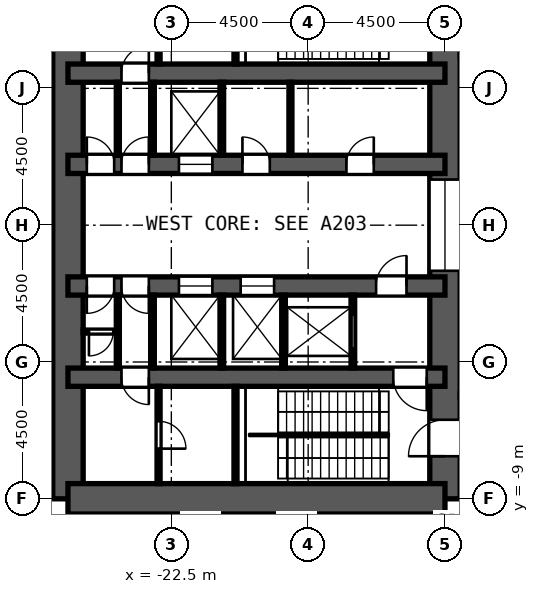
"""IFC4 building model, lengths in metres.
Left out: names, types, materials, properties, quantities, classifications, styles, units other than length and angle.
Written with IfcOpenShell. Run it as: python <this file> out.ifc"""

import sys

from ifc_helpers import new_model, si_unit, direction, frame, frame_2d, origin, place, context, subcontext, project, spatial, rectangle, extrude, element, fill, save


model = new_model("IFC4")
c1 = context("Model", 3, precision=1e-05, world=origin(), true_north=direction((0.0, 1.0)))
c2 = subcontext(c1, "Body", "Model", "MODEL_VIEW")
j1 = project(units=[si_unit("LENGTHUNIT", "METRE"), si_unit("PLANEANGLEUNIT", "RADIAN")], contexts=[c1])
p1 = place(None, origin())
s1 = spatial("IfcSite", under=j1, at=p1, CompositionType="ELEMENT")
p2 = place(p1, origin())
s2 = spatial("IfcBuilding", under=s1, at=p2, CompositionType="ELEMENT")
p3 = place(p2, origin())
s3 = spatial("IfcBuildingStorey", under=s2, at=p3, CompositionType="ELEMENT", Elevation=0.0)
p4 = place(p3, frame((-13.5, -9.0, 0.0), z_axis=(0.0, 0.0, 1.0), x_axis=(0.0, 1.0, 0.0)))
e1 = element("IfcWall", 1, at=p4, inside=s3, PredefinedType="SHEAR", context=c2, shape_type="SweptSolid", body=[
    extrude(rectangle(XDim=18.0, YDim=1.0, at=frame_2d((9.0, 0.0))), origin(), (0.0, 0.0, 1.0), 5.0),
])
p5 = place(p4, frame((15.4, 0.0, 0.0)))
e2 = element("IfcOpeningElement", 2, at=p5, cuts=e1, PredefinedType="OPENING", context=c2, shape_type="SweptSolid", body=[
    extrude(rectangle(XDim=1.2, YDim=2.1, at=frame_2d((0.6, 1.05))), frame((0.0, 0.512, 0.0), z_axis=(0.0, -1.0, 0.0), x_axis=(1.0, 0.0, 0.0)), (0.0, 0.0, 1.0), 1.024),
])
p6 = place(p4, frame((1.4, 0.0, 0.0)))
e3 = element("IfcOpeningElement", 3, at=p6, cuts=e1, PredefinedType="OPENING", context=c2, shape_type="SweptSolid", body=[
    extrude(rectangle(XDim=1.2, YDim=2.1, at=frame_2d((0.6, 1.05))), frame((0.0, 0.512, 0.0), z_axis=(0.0, -1.0, 0.0), x_axis=(1.0, 0.0, 0.0)), (0.0, 0.0, 1.0), 1.024),
])
p7 = place(p4, frame((7.5, 0.0, 0.0)))
e4 = element("IfcOpeningElement", 4, at=p7, cuts=e1, PredefinedType="OPENING", context=c2, shape_type="SweptSolid", body=[
    extrude(rectangle(XDim=3.0, YDim=2.4, at=frame_2d((1.5, 1.2))), frame((0.0, 0.512, 0.0), z_axis=(0.0, -1.0, 0.0), x_axis=(1.0, 0.0, 0.0)), (0.0, 0.0, 1.0), 1.024),
])
p8 = place(p3, frame((-25.9, -9.0, 0.0), z_axis=(0.0, 0.0, 1.0), x_axis=(0.0, 1.0, 0.0)))
e5 = element("IfcWall", 5, at=p8, inside=s3, PredefinedType="SHEAR", context=c2, shape_type="SweptSolid", body=[
    extrude(rectangle(XDim=18.0, YDim=1.0, at=frame_2d((9.0, 0.0))), origin(), (0.0, 0.0, 1.0), 5.0),
])
p9 = place(p3, frame((-13.5, -9.0, 0.0), z_axis=(0.0, 0.0, 1.0), x_axis=(-1.0, 0.0, 0.0)))
e6 = element("IfcWall", 6, at=p9, inside=s3, PredefinedType="SHEAR", context=c2, shape_type="SweptSolid", body=[
    extrude(rectangle(XDim=12.4, YDim=1.0, at=frame_2d((6.2, 0.0))), origin(), (0.0, 0.0, 1.0), 5.0),
])
p10 = place(p3, frame((-13.5, 5.0, 0.0), z_axis=(0.0, 0.0, 1.0), x_axis=(-1.0, 0.0, 0.0)))
e7 = element("IfcWall", 7, at=p10, inside=s3, PredefinedType="SHEAR", context=c2, shape_type="SweptSolid", body=[
    extrude(rectangle(XDim=12.4, YDim=0.6, at=frame_2d((6.2, 0.0))), origin(), (0.0, 0.0, 1.0), 5.0),
])
p11 = place(p10, frame((9.74, 0.0, 0.0)))
e8 = element("IfcOpeningElement", 8, at=p11, cuts=e7, PredefinedType="OPENING", context=c2, shape_type="SweptSolid", body=[
    extrude(rectangle(XDim=0.9, YDim=2.1, at=frame_2d((0.45, 1.05))), frame((0.0, 0.312, 0.0), z_axis=(0.0, -1.0, 0.0), x_axis=(1.0, 0.0, 0.0)), (0.0, 0.0, 1.0), 0.624),
])
p12 = place(p3, frame((-13.5, -5.0, 0.0), z_axis=(0.0, 0.0, 1.0), x_axis=(-1.0, 0.0, 0.0)))
e9 = element("IfcWall", 9, at=p12, inside=s3, PredefinedType="SHEAR", context=c2, shape_type="SweptSolid", body=[
    extrude(rectangle(XDim=12.4, YDim=0.6, at=frame_2d((6.2, 0.0))), origin(), (0.0, 0.0, 1.0), 5.0),
])
p13 = place(p12, frame((9.74, 0.0, 0.0)))
e10 = element("IfcOpeningElement", 10, at=p13, cuts=e9, PredefinedType="OPENING", context=c2, shape_type="SweptSolid", body=[
    extrude(rectangle(XDim=0.9, YDim=2.1, at=frame_2d((0.45, 1.05))), frame((0.0, 0.312, 0.0), z_axis=(0.0, -1.0, 0.0), x_axis=(1.0, 0.0, 0.0)), (0.0, 0.0, 1.0), 0.624),
])
p14 = place(p12, frame((0.6, 0.0, 0.0)))
e11 = element("IfcOpeningElement", 11, at=p14, cuts=e9, PredefinedType="OPENING", context=c2, shape_type="SweptSolid", body=[
    extrude(rectangle(XDim=1.1, YDim=2.1, at=frame_2d((0.55, 1.05))), frame((0.0, 0.312, 0.0), z_axis=(0.0, -1.0, 0.0), x_axis=(1.0, 0.0, 0.0)), (0.0, 0.0, 1.0), 0.624),
])
p15 = place(p3, frame((-13.5, 2.0, 0.0), z_axis=(0.0, 0.0, 1.0), x_axis=(-1.0, 0.0, 0.0)))
e12 = element("IfcWall", 12, at=p15, inside=s3, PredefinedType="SHEAR", context=c2, shape_type="SweptSolid", body=[
    extrude(rectangle(XDim=12.4, YDim=0.6, at=frame_2d((6.2, 0.0))), origin(), (0.0, 0.0, 1.0), 5.0),
])
p16 = place(p15, frame((7.65, 0.0, 0.0)))
e13 = element("IfcOpeningElement", 13, at=p16, cuts=e12, PredefinedType="OPENING", context=c2, shape_type="SweptSolid", body=[
    extrude(rectangle(XDim=1.1, YDim=2.1, at=frame_2d((0.55, 1.05))), frame((0.0, 0.312, 0.0), z_axis=(0.0, -1.0, 0.0), x_axis=(1.0, 0.0, 0.0)), (0.0, 0.0, 1.0), 0.624),
])
p17 = place(p15, frame((2.341, 0.0, 0.0)))
e14 = element("IfcOpeningElement", 14, at=p17, cuts=e12, PredefinedType="OPENING", context=c2, shape_type="SweptSolid", body=[
    extrude(rectangle(XDim=0.9, YDim=2.1, at=frame_2d((0.45, 1.05))), frame((0.0, 0.312, 0.0), z_axis=(0.0, -1.0, 0.0), x_axis=(1.0, 0.0, 0.0)), (0.0, 0.0, 1.0), 0.624),
])
p18 = place(p15, frame((5.761, 0.0, 0.0)))
e15 = element("IfcOpeningElement", 15, at=p18, cuts=e12, PredefinedType="OPENING", context=c2, shape_type="SweptSolid", body=[
    extrude(rectangle(XDim=0.9, YDim=2.1, at=frame_2d((0.45, 1.05))), frame((0.0, 0.312, 0.0), z_axis=(0.0, -1.0, 0.0), x_axis=(1.0, 0.0, 0.0)), (0.0, 0.0, 1.0), 0.624),
])
p19 = place(p15, frame((9.74, 0.0, 0.0)))
e16 = element("IfcOpeningElement", 16, at=p19, cuts=e12, PredefinedType="OPENING", context=c2, shape_type="SweptSolid", body=[
    extrude(rectangle(XDim=0.9, YDim=2.1, at=frame_2d((0.45, 1.05))), frame((0.0, 0.312, 0.0), z_axis=(0.0, -1.0, 0.0), x_axis=(1.0, 0.0, 0.0)), (0.0, 0.0, 1.0), 0.624),
])
p20 = place(p15, frame((10.88, 0.0, 0.0)))
e17 = element("IfcOpeningElement", 17, at=p20, cuts=e12, PredefinedType="OPENING", context=c2, shape_type="SweptSolid", body=[
    extrude(rectangle(XDim=0.9, YDim=2.1, at=frame_2d((0.45, 1.05))), frame((0.0, 0.312, 0.0), z_axis=(0.0, -1.0, 0.0), x_axis=(1.0, 0.0, 0.0)), (0.0, 0.0, 1.0), 0.624),
])
p21 = place(p3, frame((-13.5, -2.0, 0.0), z_axis=(0.0, 0.0, 1.0), x_axis=(-1.0, 0.0, 0.0)))
e18 = element("IfcWall", 18, at=p21, inside=s3, PredefinedType="SHEAR", context=c2, shape_type="SweptSolid", body=[
    extrude(rectangle(XDim=12.4, YDim=0.6, at=frame_2d((6.2, 0.0))), origin(), (0.0, 0.0, 1.0), 5.0),
])
p22 = place(p21, frame((5.62, 0.0, 0.0)))
e19 = element("IfcOpeningElement", 19, at=p22, cuts=e18, PredefinedType="OPENING", context=c2, shape_type="SweptSolid", body=[
    extrude(rectangle(XDim=1.1, YDim=2.1, at=frame_2d((0.55, 1.05))), frame((0.0, 0.312, 0.0), z_axis=(0.0, -1.0, 0.0), x_axis=(1.0, 0.0, 0.0)), (0.0, 0.0, 1.0), 0.624),
])
p23 = place(p21, frame((7.65, 0.0, 0.0)))
e20 = element("IfcOpeningElement", 20, at=p23, cuts=e18, PredefinedType="OPENING", context=c2, shape_type="SweptSolid", body=[
    extrude(rectangle(XDim=1.1, YDim=2.1, at=frame_2d((0.55, 1.05))), frame((0.0, 0.312, 0.0), z_axis=(0.0, -1.0, 0.0), x_axis=(1.0, 0.0, 0.0)), (0.0, 0.0, 1.0), 0.624),
])
p24 = place(p21, frame((1.265, 0.0, 0.0)))
e21 = element("IfcOpeningElement", 21, at=p24, cuts=e18, PredefinedType="OPENING", context=c2, shape_type="SweptSolid", body=[
    extrude(rectangle(XDim=1.0, YDim=2.1, at=frame_2d((0.5, 1.05))), frame((0.0, 0.312, 0.0), z_axis=(0.0, -1.0, 0.0), x_axis=(1.0, 0.0, 0.0)), (0.0, 0.0, 1.0), 0.624),
])
p25 = place(p21, frame((9.74, 0.0, 0.0)))
e22 = element("IfcOpeningElement", 22, at=p25, cuts=e18, PredefinedType="OPENING", context=c2, shape_type="SweptSolid", body=[
    extrude(rectangle(XDim=0.9, YDim=2.1, at=frame_2d((0.45, 1.05))), frame((0.0, 0.312, 0.0), z_axis=(0.0, -1.0, 0.0), x_axis=(1.0, 0.0, 0.0)), (0.0, 0.0, 1.0), 0.624),
])
p26 = place(p21, frame((10.88, 0.0, 0.0)))
e23 = element("IfcOpeningElement", 23, at=p26, cuts=e18, PredefinedType="OPENING", context=c2, shape_type="SweptSolid", body=[
    extrude(rectangle(XDim=0.9, YDim=2.1, at=frame_2d((0.45, 1.05))), frame((0.0, 0.312, 0.0), z_axis=(0.0, -1.0, 0.0), x_axis=(1.0, 0.0, 0.0)), (0.0, 0.0, 1.0), 0.624),
])
p27 = place(p3, frame((-27.73, -7.403, 0.0), z_axis=(0.0, 0.0, 1.0), x_axis=(0.342034744565, -0.939687306241, 0.0)))
e24 = element("IfcWall", 24, at=p27, inside=s3, PredefinedType="SOLIDWALL", context=c2, shape_type="SweptSolid", body=[
    extrude(rectangle(XDim=4.099, YDim=0.6, at=frame_2d((2.05, 0.0))), origin(), (0.0, 0.0, 1.0), 4.45),
])
p28 = place(p3, frame((-18.583, 2.3, 0.0), z_axis=(0.0, 0.0, 1.0), x_axis=(0.0, 1.0, 0.0)))
e25 = element("IfcWall", 25, at=p28, inside=s3, PredefinedType="PARTITIONING", context=c2, shape_type="SweptSolid", body=[
    extrude(rectangle(XDim=2.4, YDim=0.1, at=frame_2d((1.2, 0.0))), origin(), (0.0, 0.0, 1.0), 4.45),
])
for number, where, z_axis, x_axis in (
    (26, (-20.84, 2.3, 0.0), (0.0, 0.0, 1.0), (0.0, 1.0, 0.0)),
    (27, (-23.12, 2.3, 0.0), (0.0, 0.0, 1.0), (0.0, 1.0, 0.0)),
):
    element("IfcWall", number, at=place(p3, frame(where, z_axis=z_axis, x_axis=x_axis)), inside=s3, PredefinedType="PARTITIONING", context=c2, shape_type="SweptSolid", body=[
        extrude(rectangle(XDim=2.4, YDim=0.12, at=frame_2d((1.2, 0.0))), origin(), (0.0, 0.0, 1.0), 4.45),
    ])
p29 = place(p3, frame((-24.26, 2.3, 0.0), z_axis=(0.0, 0.0, 1.0), x_axis=(0.0, 1.0, 0.0)))
e28 = element("IfcWall", 28, at=p29, inside=s3, PredefinedType="PARTITIONING", context=c2, shape_type="SweptSolid", body=[
    extrude(rectangle(XDim=2.4, YDim=0.1, at=frame_2d((1.2, 0.0))), origin(), (0.0, 0.0, 1.0), 4.45),
])
p30 = place(p3, frame((-16.53, -4.7, 0.0), z_axis=(0.0, 0.0, 1.0), x_axis=(0.0, 1.0, 0.0)))
e29 = element("IfcWall", 29, at=p30, inside=s3, PredefinedType="PARTITIONING", context=c2, shape_type="SweptSolid", body=[
    extrude(rectangle(XDim=2.4, YDim=0.12, at=frame_2d((1.2, 0.0))), origin(), (0.0, 0.0, 1.0), 4.45),
])
p31 = place(p30, frame((0.65, 0.0, 0.0)))
e30 = element("IfcOpeningElement", 30, at=p31, cuts=e29, PredefinedType="OPENING", context=c2, shape_type="SweptSolid", body=[
    extrude(rectangle(XDim=1.1, YDim=2.1, at=frame_2d((0.55, 1.05))), frame((0.0, 0.072, 0.0), z_axis=(0.0, -1.0, 0.0), x_axis=(1.0, 0.0, 0.0)), (0.0, 0.0, 1.0), 0.144),
])
for number, where, z_axis, x_axis in (
    (31, (-18.81, -4.7, 0.0), (0.0, 0.0, 1.0), (0.0, 1.0, 0.0)),
    (32, (-20.84, -4.7, 0.0), (0.0, 0.0, 1.0), (0.0, 1.0, 0.0)),
    (33, (-23.12, -4.7, 0.0), (0.0, 0.0, 1.0), (0.0, 1.0, 0.0)),
):
    element("IfcWall", number, at=place(p3, frame(where, z_axis=z_axis, x_axis=x_axis)), inside=s3, PredefinedType="PARTITIONING", context=c2, shape_type="SweptSolid", body=[
        extrude(rectangle(XDim=2.4, YDim=0.12, at=frame_2d((1.2, 0.0))), origin(), (0.0, 0.0, 1.0), 4.45),
    ])
p32 = place(p3, frame((-24.26, -4.7, 0.0), z_axis=(0.0, 0.0, 1.0), x_axis=(0.0, 1.0, 0.0)))
e34 = element("IfcWall", 34, at=p32, inside=s3, PredefinedType="PARTITIONING", context=c2, shape_type="SweptSolid", body=[
    extrude(rectangle(XDim=2.4, YDim=0.1, at=frame_2d((1.2, 0.0))), origin(), (0.0, 0.0, 1.0), 4.45),
])
p33 = place(p3, frame((-24.26, -3.5, 0.0), z_axis=(0.0, 0.0, 1.0), x_axis=(-1.0, 0.0, 0.0)))
e35 = element("IfcWall", 35, at=p33, inside=s3, PredefinedType="PARTITIONING", context=c2, shape_type="SweptSolid", body=[
    extrude(rectangle(XDim=1.14, YDim=0.1, at=frame_2d((0.57, 0.0))), origin(), (0.0, 0.0, 1.0), 4.45),
])
p34 = place(p33, frame((0.15, 0.0, 0.0)))
e36 = element("IfcOpeningElement", 36, at=p34, cuts=e35, PredefinedType="OPENING", context=c2, shape_type="SweptSolid", body=[
    extrude(rectangle(XDim=0.8, YDim=2.1, at=frame_2d((0.4, 1.05))), frame((0.0, 0.062, 0.0), z_axis=(0.0, -1.0, 0.0), x_axis=(1.0, 0.0, 0.0)), (0.0, 0.0, 1.0), 0.124),
])
p35 = place(p3, frame((-20.39, 5.3, 0.0), z_axis=(0.0, 0.0, 1.0), x_axis=(0.0, 1.0, 0.0)))
e37 = element("IfcWall", 37, at=p35, inside=s3, PredefinedType="PARTITIONING", context=c2, shape_type="SweptSolid", body=[
    extrude(rectangle(XDim=3.2, YDim=0.1, at=frame_2d((1.6, 0.0))), origin(), (0.0, 0.0, 1.0), 4.45),
])
p36 = place(p3, frame((-22.92, 5.3, 0.0), z_axis=(0.0, 0.0, 1.0), x_axis=(0.0, 1.0, 0.0)))
e38 = element("IfcWall", 38, at=p36, inside=s3, PredefinedType="PARTITIONING", context=c2, shape_type="SweptSolid", body=[
    extrude(rectangle(XDim=3.2, YDim=0.1, at=frame_2d((1.6, 0.0))), origin(), (0.0, 0.0, 1.0), 4.45),
])
p37 = place(p36, frame((1.15, 0.0, 0.0)))
e39 = element("IfcOpeningElement", 39, at=p37, cuts=e38, PredefinedType="OPENING", context=c2, shape_type="SweptSolid", body=[
    extrude(rectangle(XDim=0.9, YDim=2.1, at=frame_2d((0.45, 1.05))), frame((0.0, 0.062, 0.0), z_axis=(0.0, -1.0, 0.0), x_axis=(1.0, 0.0, 0.0)), (0.0, 0.0, 1.0), 0.124),
])
p38 = place(p3, frame((-20.39, -8.5, 0.0), z_axis=(0.0, 0.0, 1.0), x_axis=(0.0, 1.0, 0.0)))
e40 = element("IfcWall", 40, at=p38, inside=s3, PredefinedType="PARTITIONING", context=c2, shape_type="SweptSolid", body=[
    extrude(rectangle(XDim=3.2, YDim=0.1, at=frame_2d((1.6, 0.0))), origin(), (0.0, 0.0, 1.0), 4.45),
])
p39 = place(p3, frame((-22.92, -8.5, 0.0), z_axis=(0.0, 0.0, 1.0), x_axis=(0.0, 1.0, 0.0)))
e41 = element("IfcWall", 41, at=p39, inside=s3, PredefinedType="PARTITIONING", context=c2, shape_type="SweptSolid", body=[
    extrude(rectangle(XDim=3.2, YDim=0.1, at=frame_2d((1.6, 0.0))), origin(), (0.0, 0.0, 1.0), 4.45),
])
p40 = place(p39, frame((1.15, 0.0, 0.0)))
e42 = element("IfcOpeningElement", 42, at=p40, cuts=e41, PredefinedType="OPENING", context=c2, shape_type="SweptSolid", body=[
    extrude(rectangle(XDim=0.9, YDim=2.1, at=frame_2d((0.45, 1.05))), frame((0.0, 0.062, 0.0), z_axis=(0.0, -1.0, 0.0), x_axis=(1.0, 0.0, 0.0)), (0.0, 0.0, 1.0), 0.124),
])
p41 = place(p16, origin())
e43 = element("IfcDoor", 43, at=p41, inside=s3, OperationType="DOUBLE_DOOR_SLIDING", PredefinedType="DOOR", context=c2, shape_type="SweptSolid", body=[
    extrude(rectangle(XDim=1.1, YDim=2.1, at=frame_2d((0.55, 1.05))), frame((0.0, 0.025, 0.0), z_axis=(0.0, -1.0, 0.0), x_axis=(1.0, 0.0, 0.0)), (0.0, 0.0, 1.0), 0.05),
])
fill(e13, e43)
p42 = place(p31, origin())
e44 = element("IfcDoor", 44, at=p42, inside=s3, OperationType="DOUBLE_DOOR_SLIDING", PredefinedType="DOOR", context=c2, shape_type="SweptSolid", body=[
    extrude(rectangle(XDim=1.1, YDim=2.1, at=frame_2d((0.55, 1.05))), frame((0.0, 0.025, 0.0), z_axis=(0.0, -1.0, 0.0), x_axis=(1.0, 0.0, 0.0)), (0.0, 0.0, 1.0), 0.05),
])
fill(e30, e44)
p43 = place(p22, origin())
e45 = element("IfcDoor", 45, at=p43, inside=s3, OperationType="DOUBLE_DOOR_SLIDING", PredefinedType="DOOR", context=c2, shape_type="SweptSolid", body=[
    extrude(rectangle(XDim=1.1, YDim=2.1, at=frame_2d((0.55, 1.05))), frame((0.0, 0.025, 0.0), z_axis=(0.0, -1.0, 0.0), x_axis=(1.0, 0.0, 0.0)), (0.0, 0.0, 1.0), 0.05),
])
fill(e19, e45)
p44 = place(p23, origin())
e46 = element("IfcDoor", 46, at=p44, inside=s3, OperationType="DOUBLE_DOOR_SLIDING", PredefinedType="DOOR", context=c2, shape_type="SweptSolid", body=[
    extrude(rectangle(XDim=1.1, YDim=2.1, at=frame_2d((0.55, 1.05))), frame((0.0, 0.025, 0.0), z_axis=(0.0, -1.0, 0.0), x_axis=(1.0, 0.0, 0.0)), (0.0, 0.0, 1.0), 0.05),
])
fill(e20, e46)
p45 = place(p17, frame((0.9, 0.0, 0.0), z_axis=(0.0, 0.0, 1.0), x_axis=(-1.0, 0.0, 0.0)))
e47 = element("IfcDoor", 47, at=p45, inside=s3, OperationType="SINGLE_SWING_RIGHT", PredefinedType="DOOR", context=c2, shape_type="SweptSolid", body=[
    extrude(rectangle(XDim=0.9, YDim=2.1, at=frame_2d((0.45, 1.05))), frame((0.0, 0.025, 0.0), z_axis=(0.0, -1.0, 0.0), x_axis=(1.0, 0.0, 0.0)), (0.0, 0.0, 1.0), 0.05),
])
fill(e14, e47)
p46 = place(p18, frame((0.9, 0.0, 0.0), z_axis=(0.0, 0.0, 1.0), x_axis=(-1.0, 0.0, 0.0)))
e48 = element("IfcDoor", 48, at=p46, inside=s3, OperationType="SINGLE_SWING_LEFT", PredefinedType="DOOR", context=c2, shape_type="SweptSolid", body=[
    extrude(rectangle(XDim=0.9, YDim=2.1, at=frame_2d((0.45, 1.05))), frame((0.0, 0.025, 0.0), z_axis=(0.0, -1.0, 0.0), x_axis=(1.0, 0.0, 0.0)), (0.0, 0.0, 1.0), 0.05),
])
fill(e15, e48)
p47 = place(p19, frame((0.9, 0.0, 0.0), z_axis=(0.0, 0.0, 1.0), x_axis=(-1.0, 0.0, 0.0)))
e49 = element("IfcDoor", 49, at=p47, inside=s3, OperationType="SINGLE_SWING_RIGHT", PredefinedType="DOOR", context=c2, shape_type="SweptSolid", body=[
    extrude(rectangle(XDim=0.9, YDim=2.1, at=frame_2d((0.45, 1.05))), frame((0.0, 0.025, 0.0), z_axis=(0.0, -1.0, 0.0), x_axis=(1.0, 0.0, 0.0)), (0.0, 0.0, 1.0), 0.05),
])
fill(e16, e49)
p48 = place(p20, frame((0.9, 0.0, 0.0), z_axis=(0.0, 0.0, 1.0), x_axis=(-1.0, 0.0, 0.0)))
e50 = element("IfcDoor", 50, at=p48, inside=s3, OperationType="SINGLE_SWING_LEFT", PredefinedType="DOOR", context=c2, shape_type="SweptSolid", body=[
    extrude(rectangle(XDim=0.9, YDim=2.1, at=frame_2d((0.45, 1.05))), frame((0.0, 0.025, 0.0), z_axis=(0.0, -1.0, 0.0), x_axis=(1.0, 0.0, 0.0)), (0.0, 0.0, 1.0), 0.05),
])
fill(e17, e50)
p49 = place(p24, frame((1.0, 0.0, 0.0), z_axis=(0.0, 0.0, 1.0), x_axis=(-1.0, 0.0, 0.0)))
e51 = element("IfcDoor", 51, at=p49, inside=s3, OperationType="SINGLE_SWING_RIGHT", PredefinedType="DOOR", context=c2, shape_type="SweptSolid", body=[
    extrude(rectangle(XDim=1.0, YDim=2.1, at=frame_2d((0.5, 1.05))), frame((0.0, 0.025, 0.0), z_axis=(0.0, -1.0, 0.0), x_axis=(1.0, 0.0, 0.0)), (0.0, 0.0, 1.0), 0.05),
])
fill(e21, e51)
p50 = place(p25, origin())
e52 = element("IfcDoor", 52, at=p50, inside=s3, OperationType="SINGLE_SWING_LEFT", PredefinedType="DOOR", context=c2, shape_type="SweptSolid", body=[
    extrude(rectangle(XDim=0.9, YDim=2.1, at=frame_2d((0.45, 1.05))), frame((0.0, 0.025, 0.0), z_axis=(0.0, -1.0, 0.0), x_axis=(1.0, 0.0, 0.0)), (0.0, 0.0, 1.0), 0.05),
])
fill(e22, e52)
p51 = place(p26, origin())
e53 = element("IfcDoor", 53, at=p51, inside=s3, OperationType="SINGLE_SWING_RIGHT", PredefinedType="DOOR", context=c2, shape_type="SweptSolid", body=[
    extrude(rectangle(XDim=0.9, YDim=2.1, at=frame_2d((0.45, 1.05))), frame((0.0, 0.025, 0.0), z_axis=(0.0, -1.0, 0.0), x_axis=(1.0, 0.0, 0.0)), (0.0, 0.0, 1.0), 0.05),
])
fill(e23, e53)
p52 = place(p11, frame((0.9, 0.0, 0.0), z_axis=(0.0, 0.0, 1.0), x_axis=(-1.0, 0.0, 0.0)))
e54 = element("IfcDoor", 54, at=p52, inside=s3, OperationType="SINGLE_SWING_RIGHT", PredefinedType="DOOR", context=c2, shape_type="SweptSolid", body=[
    extrude(rectangle(XDim=0.9, YDim=2.1, at=frame_2d((0.45, 1.05))), frame((0.0, 0.025, 0.0), z_axis=(0.0, -1.0, 0.0), x_axis=(1.0, 0.0, 0.0)), (0.0, 0.0, 1.0), 0.05),
])
fill(e8, e54)
p53 = place(p34, origin())
e55 = element("IfcDoor", 55, at=p53, inside=s3, OperationType="SINGLE_SWING_RIGHT", PredefinedType="DOOR", context=c2, shape_type="SweptSolid", body=[
    extrude(rectangle(XDim=0.8, YDim=2.1, at=frame_2d((0.4, 1.05))), frame((0.0, 0.025, 0.0), z_axis=(0.0, -1.0, 0.0), x_axis=(1.0, 0.0, 0.0)), (0.0, 0.0, 1.0), 0.05),
])
fill(e36, e55)
p54 = place(p40, frame((0.9, 0.0, 0.0), z_axis=(0.0, 0.0, 1.0), x_axis=(-1.0, 0.0, 0.0)))
e56 = element("IfcDoor", 56, at=p54, inside=s3, OperationType="SINGLE_SWING_RIGHT", PredefinedType="DOOR", context=c2, shape_type="SweptSolid", body=[
    extrude(rectangle(XDim=0.9, YDim=2.1, at=frame_2d((0.45, 1.05))), frame((0.0, 0.025, 0.0), z_axis=(0.0, -1.0, 0.0), x_axis=(1.0, 0.0, 0.0)), (0.0, 0.0, 1.0), 0.05),
])
fill(e42, e56)
p55 = place(p13, origin())
e57 = element("IfcDoor", 57, at=p55, inside=s3, OperationType="SINGLE_SWING_LEFT", PredefinedType="DOOR", context=c2, shape_type="SweptSolid", body=[
    extrude(rectangle(XDim=0.9, YDim=2.1, at=frame_2d((0.45, 1.05))), frame((0.0, 0.025, 0.0), z_axis=(0.0, -1.0, 0.0), x_axis=(1.0, 0.0, 0.0)), (0.0, 0.0, 1.0), 0.05),
])
fill(e10, e57)
p56 = place(p14, origin())
e58 = element("IfcDoor", 58, at=p56, inside=s3, OperationType="SINGLE_SWING_LEFT", PredefinedType="DOOR", context=c2, shape_type="SweptSolid", body=[
    extrude(rectangle(XDim=1.1, YDim=2.1, at=frame_2d((0.55, 1.05))), frame((0.0, 0.025, 0.0), z_axis=(0.0, -1.0, 0.0), x_axis=(1.0, 0.0, 0.0)), (0.0, 0.0, 1.0), 0.05),
])
fill(e11, e58)
p57 = place(p6, origin())
e59 = element("IfcDoor", 59, at=p57, inside=s3, OperationType="SINGLE_SWING_LEFT", PredefinedType="DOOR", context=c2, shape_type="SweptSolid", body=[
    extrude(rectangle(XDim=1.2, YDim=2.1, at=frame_2d((0.6, 1.05))), frame((0.0, 0.025, 0.0), z_axis=(0.0, -1.0, 0.0), x_axis=(1.0, 0.0, 0.0)), (0.0, 0.0, 1.0), 0.05),
])
fill(e3, e59)
p58 = place(p7, origin())
e60 = element("IfcDoor", 60, at=p58, inside=s3, OperationType="DOUBLE_DOOR_SLIDING", PredefinedType="DOOR", context=c2, shape_type="SweptSolid", body=[
    extrude(rectangle(XDim=3.0, YDim=2.4, at=frame_2d((1.5, 1.2))), frame((0.0, 0.025, 0.0), z_axis=(0.0, -1.0, 0.0), x_axis=(1.0, 0.0, 0.0)), (0.0, 0.0, 1.0), 0.05),
])
fill(e4, e60)
save(model, sys.argv[1])
